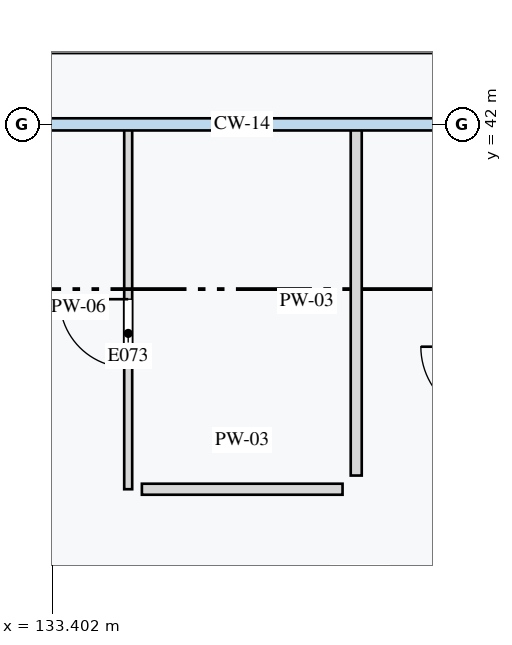
"""IFC4 building model, lengths in metres.
Left out: names, types, materials, properties, quantities, classifications, styles, units other than length and angle.
Written with IfcOpenShell. Run it as: python <this file> out.ifc"""

import sys

from ifc_helpers import new_model, si_unit, direction, frame, frame_2d, origin, place, context, subcontext, project, spatial, rectangle, extrude, element, fill, save


model = new_model("IFC4")
c1 = context("Model", 3, precision=1e-05, world=origin(), true_north=direction((0.0, 1.0)))
c2 = subcontext(c1, "Body", "Model", "MODEL_VIEW")
j1 = project(units=[si_unit("LENGTHUNIT", "METRE"), si_unit("PLANEANGLEUNIT", "RADIAN")], contexts=[c1])
p1 = place(None, origin())
s1 = spatial("IfcSite", under=j1, at=p1, CompositionType="ELEMENT")
p2 = place(p1, origin())
s2 = spatial("IfcBuilding", under=s1, at=p2, CompositionType="ELEMENT")
p3 = place(p2, origin())
s3 = spatial("IfcBuildingStorey", under=s2, at=p3, CompositionType="ELEMENT", Elevation=0.0)
p4 = place(p3, frame((134.4, 37.2, 0.0), z_axis=(0.0, 0.0, 1.0), x_axis=(0.0, 1.0, 0.0)))
e1 = element("IfcWall", 1, at=p4, inside=s3, PredefinedType="PARTITIONING", context=c2, shape_type="SweptSolid", body=[
    extrude(rectangle(XDim=4.8, YDim=0.105, at=frame_2d((2.4, 0.0))), origin(), (0.0, 0.0, 1.0), 3.92),
])
p5 = place(p4, frame((1.6, 0.0, 0.0)))
e2 = element("IfcOpeningElement", 2, at=p5, cuts=e1, PredefinedType="OPENING", context=c2, shape_type="SweptSolid", body=[
    extrude(rectangle(XDim=0.9, YDim=2.1, at=frame_2d((0.45, 1.05))), frame((0.0, 0.062, 0.0), z_axis=(0.0, -1.0, 0.0), x_axis=(1.0, 0.0, 0.0)), (0.0, 0.0, 1.0), 0.125),
])
p6 = place(p3, frame((137.4, 37.38, 0.0), z_axis=(0.0, 0.0, 1.0), x_axis=(0.0, 1.0, 0.0)))
e3 = element("IfcWall", 3, at=p6, inside=s3, PredefinedType="PARTITIONING", context=c2, shape_type="SweptSolid", body=[
    extrude(rectangle(XDim=4.6, YDim=0.145, at=frame_2d((2.3, 0.0))), origin(), (0.0, 0.0, 1.0), 3.92),
])
p7 = place(p3, frame((134.58, 37.2, 0.0), z_axis=(0.0, 0.0, 1.0), x_axis=(1.0, 0.0, 0.0)))
e4 = element("IfcWall", 4, at=p7, inside=s3, PredefinedType="PARTITIONING", context=c2, shape_type="SweptSolid", body=[
    extrude(rectangle(XDim=2.64, YDim=0.145, at=frame_2d((1.32, 0.0))), origin(), (0.0, 0.0, 1.0), 3.92),
])
p8 = place(p5, origin())
e5 = element("IfcDoor", 5, at=p8, inside=s3, OperationType="SINGLE_SWING_RIGHT", PredefinedType="DOOR", context=c2, shape_type="SweptSolid", body=[
    extrude(rectangle(XDim=0.9, YDim=2.1, at=frame_2d((0.45, 1.05))), frame((0.0, 0.025, 0.0), z_axis=(0.0, -1.0, 0.0), x_axis=(1.0, 0.0, 0.0)), (0.0, 0.0, 1.0), 0.05),
])
fill(e2, e5)
save(model, sys.argv[1])
